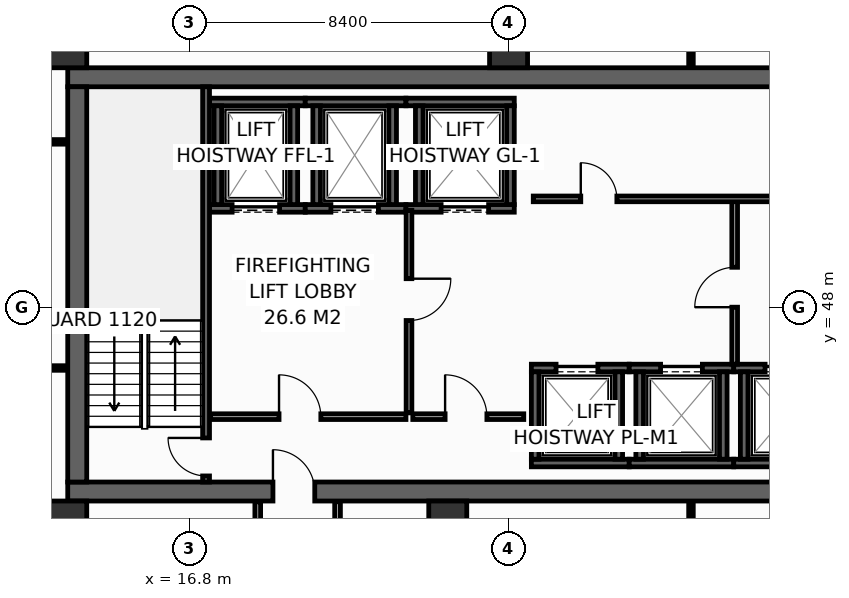
"""IFC4 building model, lengths in metres.
Left out: names, types, materials, properties, quantities, classifications, styles, units other than length and angle.
Written with IfcOpenShell. Run it as: python <this file> out.ifc"""

import sys

from ifc_helpers import new_model, si_unit, direction, frame, frame_2d, origin, origin_2d, place, context, subcontext, project, spatial, rectangle, hollow_rectangle, extrude, element, fill, save


model = new_model("IFC4")
c1 = context("Model", 3, precision=1e-05, world=origin(), true_north=direction((0.0, 1.0)))
c2 = subcontext(c1, "Body", "Model", "MODEL_VIEW")
j1 = project(units=[si_unit("LENGTHUNIT", "METRE"), si_unit("PLANEANGLEUNIT", "RADIAN")], contexts=[c1])
p1 = place(None, origin())
s1 = spatial("IfcSite", under=j1, at=p1, CompositionType="ELEMENT")
p2 = place(p1, origin())
s2 = spatial("IfcBuilding", under=s1, at=p2, CompositionType="ELEMENT")
p3 = place(p2, frame((0.0, 0.0, 144.8)))
s3 = spatial("IfcBuildingStorey", under=s2, at=p3, CompositionType="ELEMENT", Elevation=144.8)
p4 = place(p3, frame((13.6, 43.15, 0.0), z_axis=(0.0, 0.0, 1.0), x_axis=(1.0, 0.0, 0.0)))
e1 = element("IfcWall", 1, at=p4, inside=s3, PredefinedType="SHEAR", context=c2, shape_type="SweptSolid", body=[
    extrude(rectangle(XDim=32.7, YDim=0.5, at=frame_2d((16.35, 0.0))), origin(), (0.0, 0.0, 1.0), 3.55),
])
p5 = place(p4, frame((5.4, 0.0, 0.0)))
e2 = element("IfcOpeningElement", 2, at=p5, cuts=e1, PredefinedType="OPENING", context=c2, shape_type="SweptSolid", body=[
    extrude(rectangle(XDim=1.1, YDim=2.15, at=frame_2d((0.55, 1.075))), frame((0.0, 0.26, 0.0), z_axis=(0.0, -1.0, 0.0), x_axis=(1.0, 0.0, 0.0)), (0.0, 0.0, 1.0), 0.52),
])
p6 = place(p4, frame((25.6, 0.0, 0.0)))
e3 = element("IfcOpeningElement", 3, at=p6, cuts=e1, PredefinedType="OPENING", context=c2, shape_type="SweptSolid", body=[
    extrude(rectangle(XDim=1.1, YDim=2.15, at=frame_2d((0.55, 1.075))), frame((0.0, 0.26, 0.0), z_axis=(0.0, -1.0, 0.0), x_axis=(1.0, 0.0, 0.0)), (0.0, 0.0, 1.0), 0.52),
])
p7 = place(p3, frame((13.6, 54.05, 0.0), z_axis=(0.0, 0.0, 1.0), x_axis=(1.0, 0.0, 0.0)))
e4 = element("IfcWall", 4, at=p7, inside=s3, PredefinedType="SHEAR", context=c2, shape_type="SweptSolid", body=[
    extrude(rectangle(XDim=32.7, YDim=0.5, at=frame_2d((16.35, 0.0))), origin(), (0.0, 0.0, 1.0), 3.55),
])
p8 = place(p3, frame((13.85, 43.4, 0.0), z_axis=(0.0, 0.0, 1.0), x_axis=(0.0, 1.0, 0.0)))
e5 = element("IfcWall", 5, at=p8, inside=s3, PredefinedType="SHEAR", context=c2, shape_type="SweptSolid", body=[
    extrude(rectangle(XDim=10.4, YDim=0.5, at=frame_2d((5.2, 0.0))), origin(), (0.0, 0.0, 1.0), 3.55),
])
for number, where, z_axis, x_axis in (
    (6, (13.6, 54.8, 0.0), (0.0, 0.0, 1.0), (1.0, 0.0, 0.0)),
    (7, (25.2, 54.8, 0.0), (0.0, 0.0, 1.0), (1.0, 0.0, 0.0)),
    (8, (13.6, 42.4, 0.0), (0.0, 0.0, 1.0), (1.0, 0.0, 0.0)),
    (9, (23.6, 42.4, 0.0), (0.0, 0.0, 1.0), (1.0, 0.0, 0.0)),
):
    element("IfcColumn", number, at=place(p3, frame(where, z_axis=z_axis, x_axis=x_axis)), inside=s3, PredefinedType="COLUMN", context=c2, shape_type="SweptSolid", body=[
        extrude(hollow_rectangle(XDim=1.0, YDim=1.0, WallThickness=0.045, at=origin_2d()), origin(), (0.0, 0.0, 1.0), 3.8),
    ])
p9 = place(p3, frame((17.33, 50.6, 0.0), z_axis=(0.0, 0.0, 1.0), x_axis=(1.0, 0.0, 0.0)))
e10 = element("IfcWall", 10, at=p9, inside=s3, PredefinedType="SHEAR", context=c2, shape_type="SweptSolid", body=[
    extrude(rectangle(XDim=2.52, YDim=0.2, at=frame_2d((1.26, 0.0))), origin(), (0.0, 0.0, 1.0), 3.55),
])
p10 = place(p9, frame((0.595, 0.0, 0.0)))
e11 = element("IfcOpeningElement", 11, at=p10, cuts=e10, PredefinedType="OPENING", context=c2, shape_type="SweptSolid", body=[
    extrude(rectangle(XDim=1.25, YDim=2.3, at=frame_2d((0.625, 1.15))), frame((0.0, 0.11, 0.0), z_axis=(0.0, -1.0, 0.0), x_axis=(1.0, 0.0, 0.0)), (0.0, 0.0, 1.0), 0.22),
])
p11 = place(p3, frame((17.33, 53.4, 0.0), z_axis=(0.0, 0.0, 1.0), x_axis=(1.0, 0.0, 0.0)))
e12 = element("IfcWall", 12, at=p11, inside=s3, PredefinedType="SHEAR", context=c2, shape_type="SweptSolid", body=[
    extrude(rectangle(XDim=2.52, YDim=0.2, at=frame_2d((1.26, 0.0))), origin(), (0.0, 0.0, 1.0), 3.55),
])
for number, where, z_axis, x_axis in (
    (13, (17.55, 50.7, 0.0), (0.0, 0.0, 1.0), (0.0, 1.0, 0.0)),
    (14, (19.55, 50.7, 0.0), (0.0, 0.0, 1.0), (0.0, 1.0, 0.0)),
):
    element("IfcWall", number, at=place(p3, frame(where, z_axis=z_axis, x_axis=x_axis)), inside=s3, PredefinedType="SHEAR", context=c2, shape_type="SweptSolid", body=[
        extrude(rectangle(XDim=2.6, YDim=0.2, at=frame_2d((1.3, 0.0))), origin(), (0.0, 0.0, 1.0), 3.55),
    ])
p12 = place(p3, frame((19.85, 50.6, 0.0), z_axis=(0.0, 0.0, 1.0), x_axis=(1.0, 0.0, 0.0)))
e15 = element("IfcWall", 15, at=p12, inside=s3, PredefinedType="SHEAR", context=c2, shape_type="SweptSolid", body=[
    extrude(rectangle(XDim=2.65, YDim=0.2, at=frame_2d((1.325, 0.0))), origin(), (0.0, 0.0, 1.0), 3.55),
])
p13 = place(p12, frame((0.675, 0.0, 0.0)))
e16 = element("IfcOpeningElement", 16, at=p13, cuts=e15, PredefinedType="OPENING", context=c2, shape_type="SweptSolid", body=[
    extrude(rectangle(XDim=1.25, YDim=2.3, at=frame_2d((0.625, 1.15))), frame((0.0, 0.11, 0.0), z_axis=(0.0, -1.0, 0.0), x_axis=(1.0, 0.0, 0.0)), (0.0, 0.0, 1.0), 0.22),
])
p14 = place(p3, frame((19.85, 53.4, 0.0), z_axis=(0.0, 0.0, 1.0), x_axis=(1.0, 0.0, 0.0)))
e17 = element("IfcWall", 17, at=p14, inside=s3, PredefinedType="SHEAR", context=c2, shape_type="SweptSolid", body=[
    extrude(rectangle(XDim=2.65, YDim=0.2, at=frame_2d((1.325, 0.0))), origin(), (0.0, 0.0, 1.0), 3.55),
])
for number, where, z_axis, x_axis in (
    (18, (20.15, 50.7, 0.0), (0.0, 0.0, 1.0), (0.0, 1.0, 0.0)),
    (19, (22.15, 50.7, 0.0), (0.0, 0.0, 1.0), (0.0, 1.0, 0.0)),
):
    element("IfcWall", number, at=place(p3, frame(where, z_axis=z_axis, x_axis=x_axis)), inside=s3, PredefinedType="SHEAR", context=c2, shape_type="SweptSolid", body=[
        extrude(rectangle(XDim=2.6, YDim=0.2, at=frame_2d((1.3, 0.0))), origin(), (0.0, 0.0, 1.0), 3.55),
    ])
p15 = place(p3, frame((22.5, 50.6, 0.0), z_axis=(0.0, 0.0, 1.0), x_axis=(1.0, 0.0, 0.0)))
e20 = element("IfcWall", 20, at=p15, inside=s3, PredefinedType="SHEAR", context=c2, shape_type="SweptSolid", body=[
    extrude(rectangle(XDim=2.85, YDim=0.2, at=frame_2d((1.425, 0.0))), origin(), (0.0, 0.0, 1.0), 3.55),
])
p16 = place(p15, frame((0.925, 0.0, 0.0)))
e21 = element("IfcOpeningElement", 21, at=p16, cuts=e20, PredefinedType="OPENING", context=c2, shape_type="SweptSolid", body=[
    extrude(rectangle(XDim=1.25, YDim=2.3, at=frame_2d((0.625, 1.15))), frame((0.0, 0.11, 0.0), z_axis=(0.0, -1.0, 0.0), x_axis=(1.0, 0.0, 0.0)), (0.0, 0.0, 1.0), 0.22),
])
p17 = place(p3, frame((22.5, 53.4, 0.0), z_axis=(0.0, 0.0, 1.0), x_axis=(1.0, 0.0, 0.0)))
e22 = element("IfcWall", 22, at=p17, inside=s3, PredefinedType="SHEAR", context=c2, shape_type="SweptSolid", body=[
    extrude(rectangle(XDim=2.85, YDim=0.2, at=frame_2d((1.425, 0.0))), origin(), (0.0, 0.0, 1.0), 3.55),
])
for number, where, z_axis, x_axis in (
    (23, (22.85, 50.7, 0.0), (0.0, 0.0, 1.0), (0.0, 1.0, 0.0)),
    (24, (25.25, 50.7, 0.0), (0.0, 0.0, 1.0), (0.0, 1.0, 0.0)),
):
    element("IfcWall", number, at=place(p3, frame(where, z_axis=z_axis, x_axis=x_axis)), inside=s3, PredefinedType="SHEAR", context=c2, shape_type="SweptSolid", body=[
        extrude(rectangle(XDim=2.6, YDim=0.2, at=frame_2d((1.3, 0.0))), origin(), (0.0, 0.0, 1.0), 3.55),
    ])
p18 = place(p3, frame((25.8, 43.9, 0.0), z_axis=(0.0, 0.0, 1.0), x_axis=(1.0, 0.0, 0.0)))
e25 = element("IfcWall", 25, at=p18, inside=s3, PredefinedType="SHEAR", context=c2, shape_type="SweptSolid", body=[
    extrude(rectangle(XDim=2.575, YDim=0.2, at=frame_2d((1.288, 0.0))), origin(), (0.0, 0.0, 1.0), 3.55),
])
p19 = place(p3, frame((25.8, 46.4, 0.0), z_axis=(0.0, 0.0, 1.0), x_axis=(1.0, 0.0, 0.0)))
e26 = element("IfcWall", 26, at=p19, inside=s3, PredefinedType="SHEAR", context=c2, shape_type="SweptSolid", body=[
    extrude(rectangle(XDim=2.575, YDim=0.2, at=frame_2d((1.288, 0.0))), origin(), (0.0, 0.0, 1.0), 3.55),
])
p20 = place(p19, frame((0.65, 0.0, 0.0)))
e27 = element("IfcOpeningElement", 27, at=p20, cuts=e26, PredefinedType="OPENING", context=c2, shape_type="SweptSolid", body=[
    extrude(rectangle(XDim=1.1, YDim=2.2, at=frame_2d((0.55, 1.1))), frame((0.0, 0.11, 0.0), z_axis=(0.0, -1.0, 0.0), x_axis=(1.0, 0.0, 0.0)), (0.0, 0.0, 1.0), 0.22),
])
for number, where, z_axis, x_axis in (
    (28, (25.9, 44.0, 0.0), (0.0, 0.0, 1.0), (0.0, 1.0, 0.0)),
    (29, (28.1, 44.0, 0.0), (0.0, 0.0, 1.0), (0.0, 1.0, 0.0)),
):
    element("IfcWall", number, at=place(p3, frame(where, z_axis=z_axis, x_axis=x_axis)), inside=s3, PredefinedType="SHEAR", context=c2, shape_type="SweptSolid", body=[
        extrude(rectangle(XDim=2.3, YDim=0.2, at=frame_2d((1.15, 0.0))), origin(), (0.0, 0.0, 1.0), 3.55),
    ])
p21 = place(p3, frame((28.375, 43.9, 0.0), z_axis=(0.0, 0.0, 1.0), x_axis=(1.0, 0.0, 0.0)))
e30 = element("IfcWall", 30, at=p21, inside=s3, PredefinedType="SHEAR", context=c2, shape_type="SweptSolid", body=[
    extrude(rectangle(XDim=2.75, YDim=0.2, at=frame_2d((1.375, 0.0))), origin(), (0.0, 0.0, 1.0), 3.55),
])
p22 = place(p3, frame((28.375, 46.4, 0.0), z_axis=(0.0, 0.0, 1.0), x_axis=(1.0, 0.0, 0.0)))
e31 = element("IfcWall", 31, at=p22, inside=s3, PredefinedType="SHEAR", context=c2, shape_type="SweptSolid", body=[
    extrude(rectangle(XDim=2.75, YDim=0.2, at=frame_2d((1.375, 0.0))), origin(), (0.0, 0.0, 1.0), 3.55),
])
p23 = place(p22, frame((0.825, 0.0, 0.0)))
e32 = element("IfcOpeningElement", 32, at=p23, cuts=e31, PredefinedType="OPENING", context=c2, shape_type="SweptSolid", body=[
    extrude(rectangle(XDim=1.1, YDim=2.2, at=frame_2d((0.55, 1.1))), frame((0.0, 0.11, 0.0), z_axis=(0.0, -1.0, 0.0), x_axis=(1.0, 0.0, 0.0)), (0.0, 0.0, 1.0), 0.22),
])
for number, where, z_axis, x_axis in (
    (33, (28.65, 44.0, 0.0), (0.0, 0.0, 1.0), (0.0, 1.0, 0.0)),
    (34, (30.85, 44.0, 0.0), (0.0, 0.0, 1.0), (0.0, 1.0, 0.0)),
):
    element("IfcWall", number, at=place(p3, frame(where, z_axis=z_axis, x_axis=x_axis)), inside=s3, PredefinedType="SHEAR", context=c2, shape_type="SweptSolid", body=[
        extrude(rectangle(XDim=2.3, YDim=0.2, at=frame_2d((1.15, 0.0))), origin(), (0.0, 0.0, 1.0), 3.55),
    ])
p24 = place(p3, frame((31.125, 43.9, 0.0), z_axis=(0.0, 0.0, 1.0), x_axis=(1.0, 0.0, 0.0)))
e35 = element("IfcWall", 35, at=p24, inside=s3, PredefinedType="SHEAR", context=c2, shape_type="SweptSolid", body=[
    extrude(rectangle(XDim=2.575, YDim=0.2, at=frame_2d((1.288, 0.0))), origin(), (0.0, 0.0, 1.0), 3.55),
])
p25 = place(p3, frame((31.125, 46.4, 0.0), z_axis=(0.0, 0.0, 1.0), x_axis=(1.0, 0.0, 0.0)))
e36 = element("IfcWall", 36, at=p25, inside=s3, PredefinedType="SHEAR", context=c2, shape_type="SweptSolid", body=[
    extrude(rectangle(XDim=2.575, YDim=0.2, at=frame_2d((1.288, 0.0))), origin(), (0.0, 0.0, 1.0), 3.55),
])
p26 = place(p25, frame((0.825, 0.0, 0.0)))
e37 = element("IfcOpeningElement", 37, at=p26, cuts=e36, PredefinedType="OPENING", context=c2, shape_type="SweptSolid", body=[
    extrude(rectangle(XDim=1.1, YDim=2.2, at=frame_2d((0.55, 1.1))), frame((0.0, 0.11, 0.0), z_axis=(0.0, -1.0, 0.0), x_axis=(1.0, 0.0, 0.0)), (0.0, 0.0, 1.0), 0.22),
])
p27 = place(p3, frame((31.4, 44.0, 0.0), z_axis=(0.0, 0.0, 1.0), x_axis=(0.0, 1.0, 0.0)))
e38 = element("IfcWall", 38, at=p27, inside=s3, PredefinedType="SHEAR", context=c2, shape_type="SweptSolid", body=[
    extrude(rectangle(XDim=2.3, YDim=0.2, at=frame_2d((1.15, 0.0))), origin(), (0.0, 0.0, 1.0), 3.55),
])
p28 = place(p3, frame((17.24, 43.4, 0.0), z_axis=(0.0, 0.0, 1.0), x_axis=(0.0, 1.0, 0.0)))
e39 = element("IfcWall", 39, at=p28, inside=s3, PredefinedType="SHEAR", context=c2, shape_type="SweptSolid", body=[
    extrude(rectangle(XDim=10.4, YDim=0.18, at=frame_2d((5.2, 0.0))), origin(), (0.0, 0.0, 1.0), 3.55),
])
p29 = place(p28, frame((0.16, 0.0, 0.0)))
e40 = element("IfcOpeningElement", 40, at=p29, cuts=e39, PredefinedType="OPENING", context=c2, shape_type="SweptSolid", body=[
    extrude(rectangle(XDim=1.0, YDim=2.15, at=frame_2d((0.5, 1.075))), frame((0.0, 0.1, 0.0), z_axis=(0.0, -1.0, 0.0), x_axis=(1.0, 0.0, 0.0)), (0.0, 0.0, 1.0), 0.2),
])
p30 = place(p3, frame((17.36, 45.12, 0.0), z_axis=(0.0, 0.0, 1.0), x_axis=(1.0, 0.0, 0.0)))
e41 = element("IfcWall", 41, at=p30, inside=s3, PredefinedType="PARTITIONING", context=c2, shape_type="SweptSolid", body=[
    extrude(rectangle(XDim=5.14, YDim=0.15, at=frame_2d((2.57, 0.0))), origin(), (0.0, 0.0, 1.0), 3.55),
])
p31 = place(p30, frame((1.8, 0.0, 0.0)))
e42 = element("IfcOpeningElement", 42, at=p31, cuts=e41, PredefinedType="OPENING", context=c2, shape_type="SweptSolid", body=[
    extrude(rectangle(XDim=1.1, YDim=2.15, at=frame_2d((0.55, 1.075))), frame((0.0, 0.085, 0.0), z_axis=(0.0, -1.0, 0.0), x_axis=(1.0, 0.0, 0.0)), (0.0, 0.0, 1.0), 0.17),
])
p32 = place(p3, frame((22.58, 50.55, 0.0), z_axis=(0.0, 0.0, 1.0), x_axis=(0.0, -1.0, 0.0)))
e43 = element("IfcWall", 43, at=p32, inside=s3, PredefinedType="PARTITIONING", context=c2, shape_type="SweptSolid", body=[
    extrude(rectangle(XDim=5.33, YDim=0.15, at=frame_2d((2.665, 0.0))), origin(), (0.0, 0.0, 1.0), 3.55),
])
p33 = place(p32, frame((1.8, 0.0, 0.0)))
e44 = element("IfcOpeningElement", 44, at=p33, cuts=e43, PredefinedType="OPENING", context=c2, shape_type="SweptSolid", body=[
    extrude(rectangle(XDim=1.1, YDim=2.15, at=frame_2d((0.55, 1.075))), frame((0.0, 0.085, 0.0), z_axis=(0.0, -1.0, 0.0), x_axis=(1.0, 0.0, 0.0)), (0.0, 0.0, 1.0), 0.17),
])
p34 = place(p3, frame((22.68, 45.12, 0.0), z_axis=(0.0, 0.0, 1.0), x_axis=(1.0, 0.0, 0.0)))
e45 = element("IfcWall", 45, at=p34, inside=s3, PredefinedType="PARTITIONING", context=c2, shape_type="SweptSolid", body=[
    extrude(rectangle(XDim=2.92, YDim=0.15, at=frame_2d((1.46, 0.0))), origin(), (0.0, 0.0, 1.0), 3.55),
])
p35 = place(p34, frame((0.85, 0.0, 0.0)))
e46 = element("IfcOpeningElement", 46, at=p35, cuts=e45, PredefinedType="OPENING", context=c2, shape_type="SweptSolid", body=[
    extrude(rectangle(XDim=1.1, YDim=2.15, at=frame_2d((0.55, 1.075))), frame((0.0, 0.085, 0.0), z_axis=(0.0, -1.0, 0.0), x_axis=(1.0, 0.0, 0.0)), (0.0, 0.0, 1.0), 0.17),
])
p36 = place(p3, frame((31.15, 46.5, 0.0), z_axis=(0.0, 0.0, 1.0), x_axis=(0.0, 1.0, 0.0)))
e47 = element("IfcWall", 47, at=p36, inside=s3, PredefinedType="PARTITIONING", context=c2, shape_type="SweptSolid", body=[
    extrude(rectangle(XDim=4.35, YDim=0.15, at=frame_2d((2.175, 0.0))), origin(), (0.0, 0.0, 1.0), 3.55),
])
p37 = place(p36, frame((1.5, 0.0, 0.0)))
e48 = element("IfcOpeningElement", 48, at=p37, cuts=e47, PredefinedType="OPENING", context=c2, shape_type="SweptSolid", body=[
    extrude(rectangle(XDim=1.05, YDim=2.15, at=frame_2d((0.525, 1.075))), frame((0.0, 0.085, 0.0), z_axis=(0.0, -1.0, 0.0), x_axis=(1.0, 0.0, 0.0)), (0.0, 0.0, 1.0), 0.17),
])
p38 = place(p3, frame((25.85, 50.85, 0.0), z_axis=(0.0, 0.0, 1.0), x_axis=(1.0, 0.0, 0.0)))
e49 = element("IfcWall", 49, at=p38, inside=s3, PredefinedType="PARTITIONING", context=c2, shape_type="SweptSolid", body=[
    extrude(rectangle(XDim=7.65, YDim=0.15, at=frame_2d((3.825, 0.0))), origin(), (0.0, 0.0, 1.0), 3.55),
])
p39 = place(p38, frame((1.25, 0.0, 0.0)))
e50 = element("IfcOpeningElement", 50, at=p39, cuts=e49, PredefinedType="OPENING", context=c2, shape_type="SweptSolid", body=[
    extrude(rectangle(XDim=0.95, YDim=2.15, at=frame_2d((0.475, 1.075))), frame((0.0, 0.085, 0.0), z_axis=(0.0, -1.0, 0.0), x_axis=(1.0, 0.0, 0.0)), (0.0, 0.0, 1.0), 0.17),
])
p40 = place(p3, frame((11.55, 52.35, 0.0), z_axis=(0.0, 0.0, 1.0), x_axis=(1.0, 0.0, 0.0)))
e51 = element("IfcWall", 51, at=p40, inside=s3, PredefinedType="PARTITIONING", context=c2, shape_type="SweptSolid", body=[
    extrude(rectangle(XDim=2.03, YDim=0.12, at=frame_2d((1.015, 0.0))), origin(), (0.0, 0.0, 1.0), 3.55),
])
p41 = place(p3, frame((30.0, 54.32, 0.0), z_axis=(0.0, 0.0, 1.0), x_axis=(0.0, 1.0, 0.0)))
e52 = element("IfcWall", 52, at=p41, inside=s3, PredefinedType="PARTITIONING", context=c2, shape_type="SweptSolid", body=[
    extrude(rectangle(XDim=1.675, YDim=0.12, at=frame_2d((0.837, 0.0))), origin(), (0.0, 0.0, 1.0), 2.935),
])
p42 = place(p3, frame((11.55, 46.4, 0.0), z_axis=(0.0, 0.0, 1.0), x_axis=(1.0, 0.0, 0.0)))
e53 = element("IfcWall", 53, at=p42, inside=s3, PredefinedType="PARTITIONING", context=c2, shape_type="SweptSolid", body=[
    extrude(rectangle(XDim=2.03, YDim=0.12, at=frame_2d((1.015, 0.0))), origin(), (0.0, 0.0, 1.0), 3.55),
])
p43 = place(p3, frame((13.8, 41.03, 0.0), z_axis=(0.0, 0.0, 1.0), x_axis=(0.0, 1.0, 0.0)))
e54 = element("IfcWall", 54, at=p43, inside=s3, PredefinedType="PARTITIONING", context=c2, shape_type="SweptSolid", body=[
    extrude(rectangle(XDim=1.85, YDim=0.15, at=frame_2d((0.925, 0.0))), origin(), (0.0, 0.0, 1.0), 3.55),
])
for number, where, z_axis, x_axis in (
    (55, (18.6, 40.95, 0.0), (0.0, 0.0, 1.0), (0.0, 1.0, 0.0)),
    (56, (20.7, 40.95, 0.0), (0.0, 0.0, 1.0), (0.0, 1.0, 0.0)),
):
    element("IfcWall", number, at=place(p3, frame(where, z_axis=z_axis, x_axis=x_axis)), inside=s3, PredefinedType="PARTITIONING", context=c2, shape_type="SweptSolid", body=[
        extrude(rectangle(XDim=1.93, YDim=0.15, at=frame_2d((0.965, 0.0))), origin(), (0.0, 0.0, 1.0), 3.55),
    ])
p44 = place(p3, frame((30.0, 40.95, 0.0), z_axis=(0.0, 0.0, 1.0), x_axis=(0.0, 1.0, 0.0)))
e57 = element("IfcWall", 57, at=p44, inside=s3, PredefinedType="PARTITIONING", context=c2, shape_type="SweptSolid", body=[
    extrude(rectangle(XDim=1.93, YDim=0.12, at=frame_2d((0.965, 0.0))), origin(), (0.0, 0.0, 1.0), 2.835),
])
p45 = place(p10, origin())
e58 = element("IfcDoor", 58, at=p45, inside=s3, OperationType="SLIDING_TO_LEFT", PredefinedType="DOOR", context=c2, shape_type="SweptSolid", body=[
    extrude(rectangle(XDim=1.25, YDim=2.3, at=frame_2d((0.625, 1.15))), frame((0.0, 0.025, 0.0), z_axis=(0.0, -1.0, 0.0), x_axis=(1.0, 0.0, 0.0)), (0.0, 0.0, 1.0), 0.05),
])
fill(e11, e58)
p46 = place(p13, origin())
e59 = element("IfcDoor", 59, at=p46, inside=s3, OperationType="SLIDING_TO_LEFT", PredefinedType="DOOR", context=c2, shape_type="SweptSolid", body=[
    extrude(rectangle(XDim=1.25, YDim=2.3, at=frame_2d((0.625, 1.15))), frame((0.0, 0.025, 0.0), z_axis=(0.0, -1.0, 0.0), x_axis=(1.0, 0.0, 0.0)), (0.0, 0.0, 1.0), 0.05),
])
fill(e16, e59)
p47 = place(p16, origin())
e60 = element("IfcDoor", 60, at=p47, inside=s3, OperationType="SLIDING_TO_LEFT", PredefinedType="DOOR", context=c2, shape_type="SweptSolid", body=[
    extrude(rectangle(XDim=1.25, YDim=2.3, at=frame_2d((0.625, 1.15))), frame((0.0, 0.025, 0.0), z_axis=(0.0, -1.0, 0.0), x_axis=(1.0, 0.0, 0.0)), (0.0, 0.0, 1.0), 0.05),
])
fill(e21, e60)
p48 = place(p20, origin())
e61 = element("IfcDoor", 61, at=p48, inside=s3, OperationType="SLIDING_TO_LEFT", PredefinedType="DOOR", context=c2, shape_type="SweptSolid", body=[
    extrude(rectangle(XDim=1.1, YDim=2.2, at=frame_2d((0.55, 1.1))), frame((0.0, 0.025, 0.0), z_axis=(0.0, -1.0, 0.0), x_axis=(1.0, 0.0, 0.0)), (0.0, 0.0, 1.0), 0.05),
])
fill(e27, e61)
p49 = place(p23, origin())
e62 = element("IfcDoor", 62, at=p49, inside=s3, OperationType="SLIDING_TO_LEFT", PredefinedType="DOOR", context=c2, shape_type="SweptSolid", body=[
    extrude(rectangle(XDim=1.1, YDim=2.2, at=frame_2d((0.55, 1.1))), frame((0.0, 0.025, 0.0), z_axis=(0.0, -1.0, 0.0), x_axis=(1.0, 0.0, 0.0)), (0.0, 0.0, 1.0), 0.05),
])
fill(e32, e62)
p50 = place(p26, origin())
e63 = element("IfcDoor", 63, at=p50, inside=s3, OperationType="SLIDING_TO_LEFT", PredefinedType="DOOR", context=c2, shape_type="SweptSolid", body=[
    extrude(rectangle(XDim=1.1, YDim=2.2, at=frame_2d((0.55, 1.1))), frame((0.0, 0.025, 0.0), z_axis=(0.0, -1.0, 0.0), x_axis=(1.0, 0.0, 0.0)), (0.0, 0.0, 1.0), 0.05),
])
fill(e37, e63)
p51 = place(p29, origin())
e64 = element("IfcDoor", 64, at=p51, inside=s3, OperationType="SINGLE_SWING_RIGHT", PredefinedType="DOOR", context=c2, shape_type="SweptSolid", body=[
    extrude(rectangle(XDim=1.0, YDim=2.15, at=frame_2d((0.5, 1.075))), frame((0.0, 0.025, 0.0), z_axis=(0.0, -1.0, 0.0), x_axis=(1.0, 0.0, 0.0)), (0.0, 0.0, 1.0), 0.05),
])
fill(e40, e64)
p52 = place(p31, origin())
e65 = element("IfcDoor", 65, at=p52, inside=s3, OperationType="SINGLE_SWING_LEFT", PredefinedType="DOOR", context=c2, shape_type="SweptSolid", body=[
    extrude(rectangle(XDim=1.1, YDim=2.15, at=frame_2d((0.55, 1.075))), frame((0.0, 0.025, 0.0), z_axis=(0.0, -1.0, 0.0), x_axis=(1.0, 0.0, 0.0)), (0.0, 0.0, 1.0), 0.05),
])
fill(e42, e65)
p53 = place(p33, origin())
e66 = element("IfcDoor", 66, at=p53, inside=s3, OperationType="SINGLE_SWING_LEFT", PredefinedType="DOOR", context=c2, shape_type="SweptSolid", body=[
    extrude(rectangle(XDim=1.1, YDim=2.15, at=frame_2d((0.55, 1.075))), frame((0.0, 0.025, 0.0), z_axis=(0.0, -1.0, 0.0), x_axis=(1.0, 0.0, 0.0)), (0.0, 0.0, 1.0), 0.05),
])
fill(e44, e66)
p54 = place(p35, origin())
e67 = element("IfcDoor", 67, at=p54, inside=s3, OperationType="SINGLE_SWING_LEFT", PredefinedType="DOOR", context=c2, shape_type="SweptSolid", body=[
    extrude(rectangle(XDim=1.1, YDim=2.15, at=frame_2d((0.55, 1.075))), frame((0.0, 0.025, 0.0), z_axis=(0.0, -1.0, 0.0), x_axis=(1.0, 0.0, 0.0)), (0.0, 0.0, 1.0), 0.05),
])
fill(e46, e67)
p55 = place(p5, origin())
e68 = element("IfcDoor", 68, at=p55, inside=s3, OperationType="SINGLE_SWING_LEFT", PredefinedType="DOOR", context=c2, shape_type="SweptSolid", body=[
    extrude(rectangle(XDim=1.1, YDim=2.15, at=frame_2d((0.55, 1.075))), frame((0.0, 0.025, 0.0), z_axis=(0.0, -1.0, 0.0), x_axis=(1.0, 0.0, 0.0)), (0.0, 0.0, 1.0), 0.05),
])
fill(e2, e68)
p56 = place(p37, origin())
e69 = element("IfcDoor", 69, at=p56, inside=s3, OperationType="SINGLE_SWING_LEFT", PredefinedType="DOOR", context=c2, shape_type="SweptSolid", body=[
    extrude(rectangle(XDim=1.05, YDim=2.15, at=frame_2d((0.525, 1.075))), frame((0.0, 0.025, 0.0), z_axis=(0.0, -1.0, 0.0), x_axis=(1.0, 0.0, 0.0)), (0.0, 0.0, 1.0), 0.05),
])
fill(e48, e69)
p57 = place(p39, origin())
e70 = element("IfcDoor", 70, at=p57, inside=s3, OperationType="SINGLE_SWING_LEFT", PredefinedType="DOOR", context=c2, shape_type="SweptSolid", body=[
    extrude(rectangle(XDim=0.95, YDim=2.15, at=frame_2d((0.475, 1.075))), frame((0.0, 0.025, 0.0), z_axis=(0.0, -1.0, 0.0), x_axis=(1.0, 0.0, 0.0)), (0.0, 0.0, 1.0), 0.05),
])
fill(e50, e70)
save(model, sys.argv[1])
